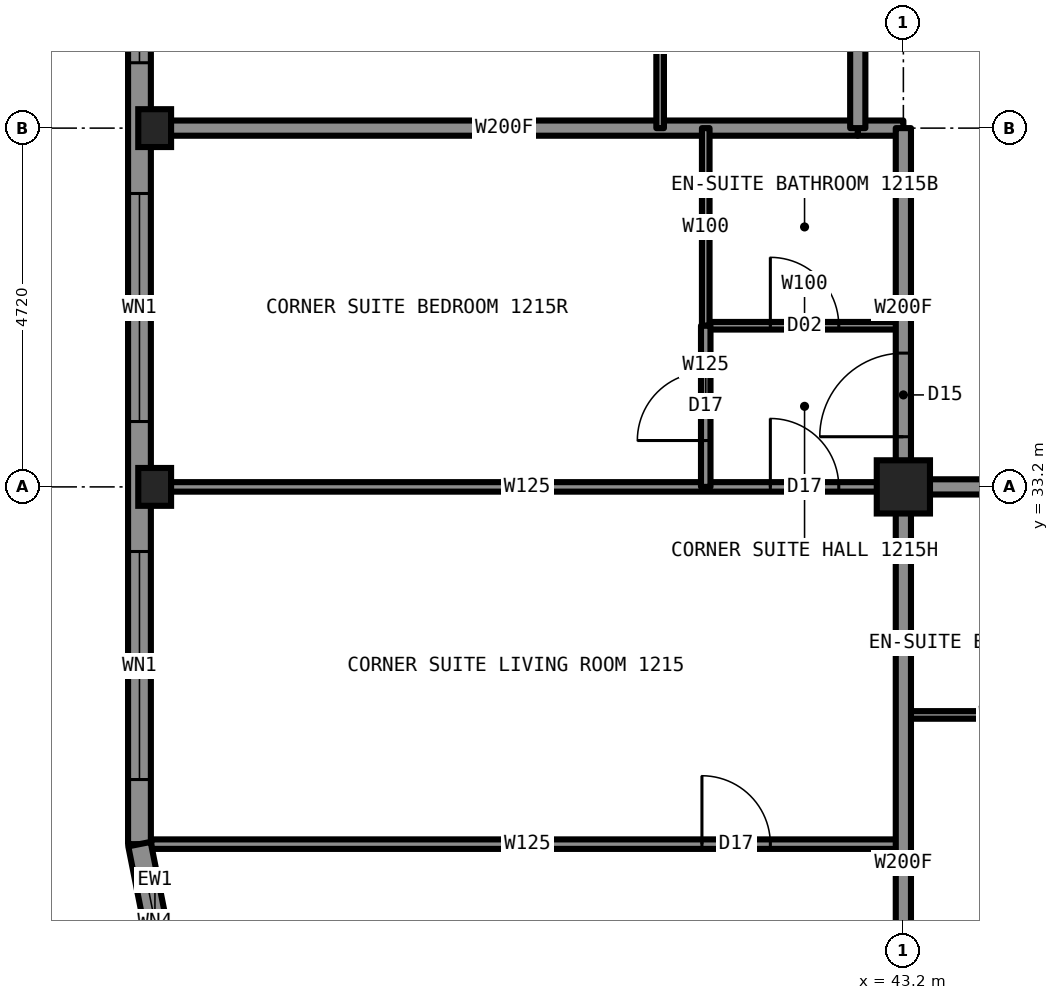
"""IFC4 building model, lengths in metres.
Left out: names, types, materials, properties, quantities, classifications, styles, units other than length and angle.
Written with IfcOpenShell. Run it as: python <this file> out.ifc"""

import sys

from ifc_helpers import new_model, si_unit, direction, frame, frame_2d, origin, origin_2d, place, context, subcontext, project, spatial, rectangle, hollow_rectangle, i_section, extrude, element, fill, save


model = new_model("IFC4")
c1 = context("Model", 3, precision=1e-05, world=origin(), true_north=direction((0.0, 1.0)))
c2 = subcontext(c1, "Body", "Model", "MODEL_VIEW")
j1 = project(units=[si_unit("LENGTHUNIT", "METRE"), si_unit("PLANEANGLEUNIT", "RADIAN")], contexts=[c1])
p1 = place(None, origin())
s1 = spatial("IfcSite", under=j1, at=p1, CompositionType="ELEMENT")
p2 = place(p1, origin())
s2 = spatial("IfcBuilding", under=s1, at=p2, CompositionType="ELEMENT")
p3 = place(p2, frame((0.0, 0.0, 49.5)))
s3 = spatial("IfcBuildingStorey", under=s2, at=p3, CompositionType="ELEMENT", Elevation=49.5)
for number, where, z_axis, x_axis in (
    (1, (33.35, 33.2, 0.0), (0.0, 0.0, 1.0), (1.0, 0.0, 0.0)),
    (2, (33.35, 37.92, 0.0), (0.0, 0.0, 1.0), (1.0, 0.0, 0.0)),
):
    element("IfcColumn", number, at=place(p3, frame(where, z_axis=z_axis, x_axis=x_axis)), inside=s3, PredefinedType="COLUMN", context=c2, shape_type="SweptSolid", body=[
        extrude(i_section(OverallWidth=0.432, OverallDepth=0.498, WebThickness=0.056, FlangeThickness=0.089, at=origin_2d()), origin(), (0.0, 0.0, 1.0), 3.5),
    ])
p4 = place(p3, frame((43.2, 33.2, 0.0), z_axis=(0.0, 0.0, 1.0), x_axis=(1.0, 0.0, 0.0)))
e3 = element("IfcColumn", 3, at=p4, inside=s3, PredefinedType="COLUMN", context=c2, shape_type="SweptSolid", body=[
    extrude(hollow_rectangle(XDim=0.7, YDim=0.7, WallThickness=0.06, at=origin_2d()), origin(), (0.0, 0.0, 1.0), 3.5),
])
p5 = place(p3, frame((43.2, 33.2, 0.0), z_axis=(0.0, 0.0, 1.0), x_axis=(1.0, 0.0, 0.0)))
e4 = element("IfcWall", 4, at=p5, inside=s3, PredefinedType="PARTITIONING", context=c2, shape_type="SweptSolid", body=[
    extrude(rectangle(XDim=23.6, YDim=0.2, at=frame_2d((11.8, 0.0))), origin(), (0.0, 0.0, 1.0), 3.33),
])
p6 = place(p5, frame((3.0, 0.0, 0.0)))
e5 = element("IfcOpeningElement", 5, at=p6, cuts=e4, PredefinedType="OPENING", context=c2, shape_type="SweptSolid", body=[
    extrude(rectangle(XDim=1.0, YDim=2.2, at=frame_2d((0.5, 1.1))), frame((0.0, 0.11, 0.0), z_axis=(0.0, -1.0, 0.0), x_axis=(1.0, 0.0, 0.0)), (0.0, 0.0, 1.0), 0.22),
])
p7 = place(p5, frame((12.44, 0.0, 0.0)))
e6 = element("IfcOpeningElement", 6, at=p7, cuts=e4, PredefinedType="OPENING", context=c2, shape_type="SweptSolid", body=[
    extrude(rectangle(XDim=1.0, YDim=2.2, at=frame_2d((0.5, 1.1))), frame((0.0, 0.11, 0.0), z_axis=(0.0, -1.0, 0.0), x_axis=(1.0, 0.0, 0.0)), (0.0, 0.0, 1.0), 0.22),
])
p8 = place(p5, frame((19.28, 0.0, 0.0)))
e7 = element("IfcOpeningElement", 7, at=p8, cuts=e4, PredefinedType="OPENING", context=c2, shape_type="SweptSolid", body=[
    extrude(rectangle(XDim=1.0, YDim=2.2, at=frame_2d((0.5, 1.1))), frame((0.0, 0.11, 0.0), z_axis=(0.0, -1.0, 0.0), x_axis=(1.0, 0.0, 0.0)), (0.0, 0.0, 1.0), 0.22),
])
p9 = place(p3, frame((33.3, 33.2, 0.0), z_axis=(0.0, 0.0, 1.0), x_axis=(1.0, 0.0, 0.0)))
e8 = element("IfcWall", 8, at=p9, inside=s3, PredefinedType="PARTITIONING", context=c2, shape_type="SweptSolid", body=[
    extrude(rectangle(XDim=9.9, YDim=0.125, at=frame_2d((4.95, 0.0))), origin(), (0.0, 0.0, 1.0), 2.573),
])
p10 = place(p9, frame((8.15, 0.0, 0.0)))
e9 = element("IfcOpeningElement", 9, at=p10, cuts=e8, PredefinedType="OPENING", context=c2, shape_type="SweptSolid", body=[
    extrude(rectangle(XDim=0.9, YDim=2.2, at=frame_2d((0.45, 1.1))), frame((0.0, 0.073, 0.0), z_axis=(0.0, -1.0, 0.0), x_axis=(1.0, 0.0, 0.0)), (0.0, 0.0, 1.0), 0.145),
])
p11 = place(p3, frame((43.2, 30.2, 0.0), z_axis=(0.0, 0.0, 1.0), x_axis=(1.0, 0.0, 0.0)))
e10 = element("IfcWall", 10, at=p11, inside=s3, PredefinedType="PARTITIONING", context=c2, shape_type="SweptSolid", body=[
    extrude(rectangle(XDim=2.6, YDim=0.1, at=frame_2d((1.3, 0.0))), origin(), (0.0, 0.0, 1.0), 3.33),
])
p12 = place(p3, frame((33.306, 28.5, 0.0), z_axis=(0.0, 0.0, 1.0), x_axis=(1.0, 0.0, 0.0)))
e11 = element("IfcWall", 11, at=p12, inside=s3, PredefinedType="PARTITIONING", context=c2, shape_type="SweptSolid", body=[
    extrude(rectangle(XDim=9.894, YDim=0.125, at=frame_2d((4.947, 0.0))), origin(), (0.0, 0.0, 1.0), 3.33),
])
p13 = place(p12, frame((7.244, 0.0, 0.0)))
e12 = element("IfcOpeningElement", 12, at=p13, cuts=e11, PredefinedType="OPENING", context=c2, shape_type="SweptSolid", body=[
    extrude(rectangle(XDim=0.9, YDim=2.2, at=frame_2d((0.45, 1.1))), frame((0.0, 0.073, 0.0), z_axis=(0.0, -1.0, 0.0), x_axis=(1.0, 0.0, 0.0)), (0.0, 0.0, 1.0), 0.145),
])
p14 = place(p3, frame((42.6, 37.92, 0.0), z_axis=(0.0, 0.0, 1.0), x_axis=(1.0, 0.0, 0.0)))
e13 = element("IfcWall", 13, at=p14, inside=s3, PredefinedType="PARTITIONING", context=c2, shape_type="SweptSolid", body=[
    extrude(rectangle(XDim=0.6, YDim=0.2, at=frame_2d((0.3, 0.0))), origin(), (0.0, 0.0, 1.0), 2.573),
])
p15 = place(p3, frame((33.3, 37.92, 0.0), z_axis=(0.0, 0.0, 1.0), x_axis=(1.0, 0.0, 0.0)))
e14 = element("IfcWall", 14, at=p15, inside=s3, PredefinedType="PARTITIONING", context=c2, shape_type="SweptSolid", body=[
    extrude(rectangle(XDim=9.3, YDim=0.2, at=frame_2d((4.65, 0.0))), origin(), (0.0, 0.0, 1.0), 2.573),
])
p16 = place(p3, frame((40.6, 35.32, 0.0), z_axis=(0.0, 0.0, 1.0), x_axis=(1.0, 0.0, 0.0)))
e15 = element("IfcWall", 15, at=p16, inside=s3, PredefinedType="PARTITIONING", context=c2, shape_type="SweptSolid", body=[
    extrude(rectangle(XDim=2.6, YDim=0.1, at=frame_2d((1.3, 0.0))), origin(), (0.0, 0.0, 1.0), 3.33),
])
p17 = place(p16, frame((0.85, 0.0, 0.0)))
e16 = element("IfcOpeningElement", 16, at=p17, cuts=e15, PredefinedType="OPENING", context=c2, shape_type="SweptSolid", body=[
    extrude(rectangle(XDim=0.9, YDim=2.1, at=frame_2d((0.45, 1.05))), frame((0.0, 0.06, 0.0), z_axis=(0.0, -1.0, 0.0), x_axis=(1.0, 0.0, 0.0)), (0.0, 0.0, 1.0), 0.12),
])
p18 = place(p3, frame((43.2, 33.2, 0.0), z_axis=(0.0, 0.0, 1.0), x_axis=(0.0, 1.0, 0.0)))
e17 = element("IfcWall", 17, at=p18, inside=s3, PredefinedType="PARTITIONING", context=c2, shape_type="SweptSolid", body=[
    extrude(rectangle(XDim=4.72, YDim=0.2, at=frame_2d((2.36, 0.0))), origin(), (0.0, 0.0, 1.0), 3.33),
])
p19 = place(p18, frame((0.66, 0.0, 0.0)))
e18 = element("IfcOpeningElement", 18, at=p19, cuts=e17, PredefinedType="OPENING", context=c2, shape_type="SweptSolid", body=[
    extrude(rectangle(XDim=1.1, YDim=2.2, at=frame_2d((0.55, 1.1))), frame((0.0, 0.11, 0.0), z_axis=(0.0, -1.0, 0.0), x_axis=(1.0, 0.0, 0.0)), (0.0, 0.0, 1.0), 0.22),
])
p20 = place(p3, frame((43.2, 23.3, 0.0), z_axis=(0.0, 0.0, 1.0), x_axis=(0.0, 1.0, 0.0)))
e19 = element("IfcWall", 19, at=p20, inside=s3, PredefinedType="PARTITIONING", context=c2, shape_type="SweptSolid", body=[
    extrude(rectangle(XDim=9.9, YDim=0.2, at=frame_2d((4.95, 0.0))), origin(), (0.0, 0.0, 1.0), 2.573),
])
p21 = place(p3, frame((42.6, 37.92, 0.0), z_axis=(0.0, 0.0, 1.0), x_axis=(0.0, 1.0, 0.0)))
e20 = element("IfcWall", 20, at=p21, inside=s3, PredefinedType="PARTITIONING", context=c2, shape_type="SweptSolid", body=[
    extrude(rectangle(XDim=14.16, YDim=0.2, at=frame_2d((7.08, 0.0))), origin(), (0.0, 0.0, 1.0), 3.33),
])
p22 = place(p21, frame((2.55, 0.0, 0.0)))
e21 = element("IfcOpeningElement", 21, at=p22, cuts=e20, PredefinedType="OPENING", context=c2, shape_type="SweptSolid", body=[
    extrude(rectangle(XDim=1.0, YDim=2.2, at=frame_2d((0.5, 1.1))), frame((0.0, 0.11, 0.0), z_axis=(0.0, -1.0, 0.0), x_axis=(1.0, 0.0, 0.0)), (0.0, 0.0, 1.0), 0.22),
])
p23 = place(p21, frame((6.18, 0.0, 0.0)))
e22 = element("IfcOpeningElement", 22, at=p23, cuts=e20, PredefinedType="OPENING", context=c2, shape_type="SweptSolid", body=[
    extrude(rectangle(XDim=1.0, YDim=2.2, at=frame_2d((0.5, 1.1))), frame((0.0, 0.11, 0.0), z_axis=(0.0, -1.0, 0.0), x_axis=(1.0, 0.0, 0.0)), (0.0, 0.0, 1.0), 0.22),
])
p24 = place(p21, frame((11.99, 0.0, 0.0)))
e23 = element("IfcOpeningElement", 23, at=p24, cuts=e20, PredefinedType="OPENING", context=c2, shape_type="SweptSolid", body=[
    extrude(rectangle(XDim=1.0, YDim=2.2, at=frame_2d((0.5, 1.1))), frame((0.0, 0.11, 0.0), z_axis=(0.0, -1.0, 0.0), x_axis=(1.0, 0.0, 0.0)), (0.0, 0.0, 1.0), 0.22),
])
p25 = place(p3, frame((40.6, 35.32, 0.0), z_axis=(0.0, 0.0, 1.0), x_axis=(0.0, 1.0, 0.0)))
e24 = element("IfcWall", 24, at=p25, inside=s3, PredefinedType="PARTITIONING", context=c2, shape_type="SweptSolid", body=[
    extrude(rectangle(XDim=2.6, YDim=0.1, at=frame_2d((1.3, 0.0))), origin(), (0.0, 0.0, 1.0), 3.33),
])
p26 = place(p3, frame((40.6, 33.2, 0.0), z_axis=(0.0, 0.0, 1.0), x_axis=(0.0, 1.0, 0.0)))
e25 = element("IfcWall", 25, at=p26, inside=s3, PredefinedType="PARTITIONING", context=c2, shape_type="SweptSolid", body=[
    extrude(rectangle(XDim=2.12, YDim=0.125, at=frame_2d((1.06, 0.0))), origin(), (0.0, 0.0, 1.0), 3.33),
])
p27 = place(p26, frame((0.61, 0.0, 0.0)))
e26 = element("IfcOpeningElement", 26, at=p27, cuts=e25, PredefinedType="OPENING", context=c2, shape_type="SweptSolid", body=[
    extrude(rectangle(XDim=0.9, YDim=2.2, at=frame_2d((0.45, 1.1))), frame((0.0, 0.073, 0.0), z_axis=(0.0, -1.0, 0.0), x_axis=(1.0, 0.0, 0.0)), (0.0, 0.0, 1.0), 0.145),
])
p28 = place(p3, frame((40.0, 37.92, 0.0), z_axis=(0.0, 0.0, 1.0), x_axis=(0.0, 1.0, 0.0)))
e27 = element("IfcWall", 27, at=p28, inside=s3, PredefinedType="PARTITIONING", context=c2, shape_type="SweptSolid", body=[
    extrude(rectangle(XDim=2.3, YDim=0.1, at=frame_2d((1.15, 0.0))), origin(), (0.0, 0.0, 1.0), 3.33),
])
p29 = place(p3, frame((33.15, 61.5, 0.0), z_axis=(0.0, 0.0, 1.0), x_axis=(0.0, -1.0, 0.0)))
e28 = element("IfcWall", 28, at=p29, inside=s3, PredefinedType="SOLIDWALL", context=c2, shape_type="SweptSolid", body=[
    extrude(rectangle(XDim=33.0, YDim=0.3, at=frame_2d((16.5, 0.0))), origin(), (0.0, 0.0, 1.0), 2.83),
])
p30 = place(p29, frame((0.85, 0.0, 0.5)))
e29 = element("IfcOpeningElement", 29, at=p30, cuts=e28, PredefinedType="OPENING", context=c2, shape_type="SweptSolid", body=[
    extrude(rectangle(XDim=3.0, YDim=2.0, at=frame_2d((1.5, 1.0))), frame((0.0, 0.16, 0.0), z_axis=(0.0, -1.0, 0.0), x_axis=(1.0, 0.0, 0.0)), (0.0, 0.0, 1.0), 0.32),
])
p31 = place(p29, frame((5.56, 0.0, 0.5)))
e30 = element("IfcOpeningElement", 30, at=p31, cuts=e28, PredefinedType="OPENING", context=c2, shape_type="SweptSolid", body=[
    extrude(rectangle(XDim=3.0, YDim=2.0, at=frame_2d((1.5, 1.0))), frame((0.0, 0.16, 0.0), z_axis=(0.0, -1.0, 0.0), x_axis=(1.0, 0.0, 0.0)), (0.0, 0.0, 1.0), 0.32),
])
p32 = place(p29, frame((10.28, 0.0, 1.1)))
e31 = element("IfcOpeningElement", 31, at=p32, cuts=e28, PredefinedType="OPENING", context=c2, shape_type="SweptSolid", body=[
    extrude(rectangle(XDim=1.1, YDim=1.4, at=frame_2d((0.55, 0.7))), frame((0.0, 0.16, 0.0), z_axis=(0.0, -1.0, 0.0), x_axis=(1.0, 0.0, 0.0)), (0.0, 0.0, 1.0), 0.32),
])
p33 = place(p29, frame((15.0, 0.0, 0.5)))
e32 = element("IfcOpeningElement", 32, at=p33, cuts=e28, PredefinedType="OPENING", context=c2, shape_type="SweptSolid", body=[
    extrude(rectangle(XDim=3.0, YDim=2.0, at=frame_2d((1.5, 1.0))), frame((0.0, 0.16, 0.0), z_axis=(0.0, -1.0, 0.0), x_axis=(1.0, 0.0, 0.0)), (0.0, 0.0, 1.0), 0.32),
])
p34 = place(p29, frame((21.62, 0.0, 1.1)))
e33 = element("IfcOpeningElement", 33, at=p34, cuts=e28, PredefinedType="OPENING", context=c2, shape_type="SweptSolid", body=[
    extrude(rectangle(XDim=1.1, YDim=1.4, at=frame_2d((0.55, 0.7))), frame((0.0, 0.16, 0.0), z_axis=(0.0, -1.0, 0.0), x_axis=(1.0, 0.0, 0.0)), (0.0, 0.0, 1.0), 0.32),
])
p35 = place(p29, frame((24.44, 0.0, 0.5)))
e34 = element("IfcOpeningElement", 34, at=p35, cuts=e28, PredefinedType="OPENING", context=c2, shape_type="SweptSolid", body=[
    extrude(rectangle(XDim=3.0, YDim=2.0, at=frame_2d((1.5, 1.0))), frame((0.0, 0.16, 0.0), z_axis=(0.0, -1.0, 0.0), x_axis=(1.0, 0.0, 0.0)), (0.0, 0.0, 1.0), 0.32),
])
p36 = place(p29, frame((29.15, 0.0, 0.5)))
e35 = element("IfcOpeningElement", 35, at=p36, cuts=e28, PredefinedType="OPENING", context=c2, shape_type="SweptSolid", body=[
    extrude(rectangle(XDim=3.0, YDim=2.0, at=frame_2d((1.5, 1.0))), frame((0.0, 0.16, 0.0), z_axis=(0.0, -1.0, 0.0), x_axis=(1.0, 0.0, 0.0)), (0.0, 0.0, 1.0), 0.32),
])
p37 = place(p3, frame((33.15, 28.5, 0.0), z_axis=(0.0, 0.0, 1.0), x_axis=(0.195081421501, -0.980787050784, 0.0)))
e36 = element("IfcWall", 36, at=p37, inside=s3, PredefinedType="SOLIDWALL", context=c2, shape_type="SweptSolid", body=[
    extrude(rectangle(XDim=2.087, YDim=0.3, at=frame_2d((1.044, 0.0))), origin(), (0.0, 0.0, 1.0), 3.33),
])
p38 = place(p37, frame((0.444, 0.0, 0.5)))
e37 = element("IfcOpeningElement", 37, at=p38, cuts=e36, PredefinedType="OPENING", context=c2, shape_type="SweptSolid", body=[
    extrude(rectangle(XDim=1.2, YDim=2.0, at=frame_2d((0.6, 1.0))), frame((0.0, 0.16, 0.0), z_axis=(0.0, -1.0, 0.0), x_axis=(1.0, 0.0, 0.0)), (0.0, 0.0, 1.0), 0.32),
])
p39 = place(p10, origin())
e38 = element("IfcDoor", 38, at=p39, inside=s3, OperationType="SINGLE_SWING_LEFT", PredefinedType="DOOR", context=c2, shape_type="SweptSolid", body=[
    extrude(rectangle(XDim=0.9, YDim=2.2, at=frame_2d((0.45, 1.1))), frame((0.0, 0.025, 0.0), z_axis=(0.0, -1.0, 0.0), x_axis=(1.0, 0.0, 0.0)), (0.0, 0.0, 1.0), 0.05),
])
fill(e9, e38)
p40 = place(p17, origin())
e39 = element("IfcDoor", 39, at=p40, inside=s3, OperationType="SINGLE_SWING_RIGHT", PredefinedType="DOOR", context=c2, shape_type="SweptSolid", body=[
    extrude(rectangle(XDim=0.9, YDim=2.1, at=frame_2d((0.45, 1.05))), frame((0.0, 0.025, 0.0), z_axis=(0.0, -1.0, 0.0), x_axis=(1.0, 0.0, 0.0)), (0.0, 0.0, 1.0), 0.05),
])
fill(e16, e39)
p41 = place(p19, origin())
e40 = element("IfcDoor", 40, at=p41, inside=s3, OperationType="SINGLE_SWING_LEFT", PredefinedType="DOOR", context=c2, shape_type="SweptSolid", body=[
    extrude(rectangle(XDim=1.1, YDim=2.2, at=frame_2d((0.55, 1.1))), frame((0.0, 0.025, 0.0), z_axis=(0.0, -1.0, 0.0), x_axis=(1.0, 0.0, 0.0)), (0.0, 0.0, 1.0), 0.05),
])
fill(e18, e40)
p42 = place(p13, origin())
e41 = element("IfcDoor", 41, at=p42, inside=s3, OperationType="SINGLE_SWING_LEFT", PredefinedType="DOOR", context=c2, shape_type="SweptSolid", body=[
    extrude(rectangle(XDim=0.9, YDim=2.2, at=frame_2d((0.45, 1.1))), frame((0.0, 0.025, 0.0), z_axis=(0.0, -1.0, 0.0), x_axis=(1.0, 0.0, 0.0)), (0.0, 0.0, 1.0), 0.05),
])
fill(e12, e41)
p43 = place(p27, origin())
e42 = element("IfcDoor", 42, at=p43, inside=s3, OperationType="SINGLE_SWING_LEFT", PredefinedType="DOOR", context=c2, shape_type="SweptSolid", body=[
    extrude(rectangle(XDim=0.9, YDim=2.2, at=frame_2d((0.45, 1.1))), frame((0.0, 0.025, 0.0), z_axis=(0.0, -1.0, 0.0), x_axis=(1.0, 0.0, 0.0)), (0.0, 0.0, 1.0), 0.05),
])
fill(e26, e42)
p44 = place(p34, origin())
e43 = element("IfcWindow", 43, at=p44, inside=s3, PartitioningType="SINGLE_PANEL", PredefinedType="WINDOW", context=c2, shape_type="SweptSolid", body=[
    extrude(rectangle(XDim=1.1, YDim=1.4, at=frame_2d((0.55, 0.7))), frame((0.0, 0.03, 0.0), z_axis=(0.0, -1.0, 0.0), x_axis=(1.0, 0.0, 0.0)), (0.0, 0.0, 1.0), 0.06),
])
fill(e33, e43)
p45 = place(p35, origin())
e44 = element("IfcWindow", 44, at=p45, inside=s3, PartitioningType="SINGLE_PANEL", PredefinedType="WINDOW", context=c2, shape_type="SweptSolid", body=[
    extrude(rectangle(XDim=3.0, YDim=2.0, at=frame_2d((1.5, 1.0))), frame((0.0, 0.03, 0.0), z_axis=(0.0, -1.0, 0.0), x_axis=(1.0, 0.0, 0.0)), (0.0, 0.0, 1.0), 0.06),
])
fill(e34, e44)
p46 = place(p36, origin())
e45 = element("IfcWindow", 45, at=p46, inside=s3, PartitioningType="SINGLE_PANEL", PredefinedType="WINDOW", context=c2, shape_type="SweptSolid", body=[
    extrude(rectangle(XDim=3.0, YDim=2.0, at=frame_2d((1.5, 1.0))), frame((0.0, 0.03, 0.0), z_axis=(0.0, -1.0, 0.0), x_axis=(1.0, 0.0, 0.0)), (0.0, 0.0, 1.0), 0.06),
])
fill(e35, e45)
p47 = place(p38, origin())
e46 = element("IfcWindow", 46, at=p47, inside=s3, PartitioningType="SINGLE_PANEL", PredefinedType="WINDOW", context=c2, shape_type="SweptSolid", body=[
    extrude(rectangle(XDim=1.2, YDim=2.0, at=frame_2d((0.6, 1.0))), frame((0.0, 0.03, 0.0), z_axis=(0.0, -1.0, 0.0), x_axis=(1.0, 0.0, 0.0)), (0.0, 0.0, 1.0), 0.06),
])
fill(e37, e46)
save(model, sys.argv[1])
